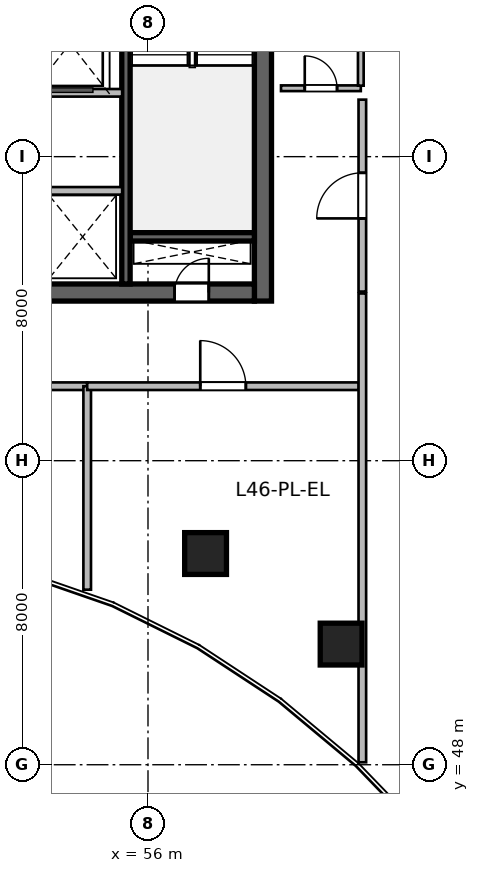
"""IFC4 building model, lengths in metres.
Left out: names, types, materials, properties, quantities, classifications, styles, units other than length and angle.
Written with IfcOpenShell. Run it as: python <this file> out.ifc"""

import sys

from ifc_helpers import new_model, si_unit, direction, frame, frame_2d, origin, origin_2d, place, context, subcontext, project, spatial, rectangle, circle, extrude, source, transform, mapped, element, fill, save


model = new_model("IFC4")
c1 = context("Model", 3, precision=1e-05, world=origin(), true_north=direction((0.0, 1.0)))
c2 = subcontext(c1, "Body", "Model", "MODEL_VIEW")
j1 = project(units=[si_unit("LENGTHUNIT", "METRE"), si_unit("PLANEANGLEUNIT", "RADIAN")], contexts=[c1])
p1 = place(None, origin())
s1 = spatial("IfcSite", under=j1, at=p1, CompositionType="ELEMENT")
p2 = place(p1, origin())
s2 = spatial("IfcBuilding", under=s1, at=p2, CompositionType="ELEMENT")
p3 = place(p2, frame((0.0, 0.0, 189.6)))
s3 = spatial("IfcBuildingStorey", under=s2, at=p3, CompositionType="ELEMENT", Elevation=189.6)
m1 = source(origin(), c2, "Body", "SweptSolid", [
    extrude(rectangle(XDim=12.0, YDim=0.45, at=frame_2d((6.0, 0.0))), origin(), (0.0, 0.0, 1.0), 4.8),
])
p4 = place(p3, frame((59.025, 60.2, 0.0), z_axis=(0.0, 0.0, 1.0), x_axis=(0.0, 1.0, 0.0)))
e1 = element("IfcWall", 1, at=p4, inside=s3, PredefinedType="SHEAR", context=c2, shape_type="MappedRepresentation", body=[
    mapped(m1, transform((0.0, 0.0, 0.0), scale=1.0)),
])
m2 = source(origin(), c2, "Body", "SweptSolid", [
    extrude(rectangle(XDim=21.6, YDim=0.45, at=frame_2d((10.8, 0.0))), origin(), (0.0, 0.0, 1.0), 4.8),
])
p5 = place(p3, frame((37.2, 60.425, 0.0), z_axis=(0.0, 0.0, 1.0), x_axis=(1.0, 0.0, 0.0)))
e2 = element("IfcWall", 2, at=p5, inside=s3, PredefinedType="SHEAR", context=c2, shape_type="MappedRepresentation", body=[
    mapped(m2, transform((0.0, 0.0, 0.0), scale=1.0)),
])
p6 = place(p5, frame((1.1, 0.0, 0.0)))
e3 = element("IfcOpeningElement", 3, at=p6, cuts=e2, PredefinedType="OPENING", context=c2, shape_type="SweptSolid", body=[
    extrude(rectangle(XDim=1.15, YDim=2.15, at=frame_2d((0.575, 1.075))), frame((0.0, 0.235, 0.0), z_axis=(0.0, -1.0, 0.0), x_axis=(1.0, 0.0, 0.0)), (0.0, 0.0, 1.0), 0.47),
])
p7 = place(p5, frame((19.5, 0.0, 0.0)))
e4 = element("IfcOpeningElement", 4, at=p7, cuts=e2, PredefinedType="OPENING", context=c2, shape_type="SweptSolid", body=[
    extrude(rectangle(XDim=0.9, YDim=2.1, at=frame_2d((0.45, 1.05))), frame((0.0, 0.235, 0.0), z_axis=(0.0, -1.0, 0.0), x_axis=(1.0, 0.0, 0.0)), (0.0, 0.0, 1.0), 0.47),
])
p8 = place(p5, frame((12.02, 0.0, 0.0)))
e5 = element("IfcOpeningElement", 5, at=p8, cuts=e2, PredefinedType="OPENING", context=c2, shape_type="SweptSolid", body=[
    extrude(rectangle(XDim=1.6, YDim=2.15, at=frame_2d((0.8, 1.075))), frame((0.0, 0.235, 0.0), z_axis=(0.0, -1.0, 0.0), x_axis=(1.0, 0.0, 0.0)), (0.0, 0.0, 1.0), 0.47),
])
m3 = source(origin(), c2, "Body", "SweptSolid", [
    extrude(rectangle(XDim=3.27, YDim=0.22, at=frame_2d((1.635, 0.0))), origin(), (0.0, 0.0, 1.0), 4.8),
])
p9 = place(p3, frame((55.53, 61.89, 0.0), z_axis=(0.0, 0.0, 1.0), x_axis=(1.0, 0.0, 0.0)))
e6 = element("IfcWall", 6, at=p9, inside=s3, PredefinedType="SHEAR", context=c2, shape_type="MappedRepresentation", body=[
    mapped(m3, transform((0.0, 0.0, 0.0), scale=1.0)),
])
m4 = source(origin(), c2, "Body", "SweptSolid", [
    extrude(rectangle(XDim=11.1, YDim=0.22, at=frame_2d((5.55, 0.0))), origin(), (0.0, 0.0, 1.0), 4.8),
])
p10 = place(p3, frame((55.42, 60.65, 0.0), z_axis=(0.0, 0.0, 1.0), x_axis=(0.0, 1.0, 0.0)))
e7 = element("IfcWall", 7, at=p10, inside=s3, PredefinedType="SHEAR", context=c2, shape_type="MappedRepresentation", body=[
    mapped(m4, transform((0.0, 0.0, 0.0), scale=1.0)),
])
p11 = place(p10, frame((9.595, 0.0, 0.0)))
e8 = element("IfcOpeningElement", 8, at=p11, cuts=e7, PredefinedType="OPENING", context=c2, shape_type="SweptSolid", body=[
    extrude(rectangle(XDim=1.15, YDim=2.15, at=frame_2d((0.575, 1.075))), frame((0.0, 0.12, 0.0), z_axis=(0.0, -1.0, 0.0), x_axis=(1.0, 0.0, 0.0)), (0.0, 0.0, 1.0), 0.24),
])
m5 = source(origin(), c2, "Body", "SweptSolid", [
    extrude(circle(Radius=0.55, at=origin_2d()), origin(), (0.0, 0.0, 1.0), 4.8),
])
for number, where, z_axis, x_axis in (
    (9, (57.515, 53.558, 0.0), (0.0, 0.0, 1.0), (0.289, 0.957, 0.0)),
    (10, (61.082, 51.175, 0.0), (0.0, 0.0, 1.0), (0.409, 0.912, 0.0)),
):
    element("IfcColumn", number, at=place(p3, frame(where, z_axis=z_axis, x_axis=x_axis)), inside=s3, PredefinedType="COLUMN", context=c2, shape_type="MappedRepresentation", body=[
        mapped(m5, transform((0.0, 0.0, 0.0), scale=1.0)),
    ])
m6 = source(origin(), c2, "Body", "SweptSolid", [
    extrude(rectangle(XDim=5.62, YDim=0.2, at=frame_2d((2.81, 0.0))), origin(), (0.0, 0.0, 1.0), 4.48),
])
p12 = place(p3, frame((49.7, 65.68, 0.0), z_axis=(0.0, 0.0, 1.0), x_axis=(1.0, 0.0, 0.0)))
e11 = element("IfcWall", 11, at=p12, inside=s3, PredefinedType="SOLIDWALL", context=c2, shape_type="MappedRepresentation", body=[
    mapped(m6, transform((0.0, 0.0, 0.0), scale=1.0)),
])
m7 = source(origin(), c2, "Body", "SweptSolid", [
    extrude(rectangle(XDim=4.1, YDim=0.2, at=frame_2d((2.05, 0.0))), origin(), (0.0, 0.0, 1.0), 4.48),
])
p13 = place(p3, frame((51.22, 63.1, 0.0), z_axis=(0.0, 0.0, 1.0), x_axis=(1.0, 0.0, 0.0)))
e12 = element("IfcWall", 12, at=p13, inside=s3, PredefinedType="SOLIDWALL", context=c2, shape_type="MappedRepresentation", body=[
    mapped(m7, transform((0.0, 0.0, 0.0), scale=1.0)),
])
m8 = source(origin(), c2, "Body", "SweptSolid", [
    extrude(rectangle(XDim=2.1, YDim=0.15, at=frame_2d((1.05, 0.0))), origin(), (0.0, 0.0, 1.0), 4.48),
])
p14 = place(p3, frame((59.5, 65.8, 0.0), z_axis=(0.0, 0.0, 1.0), x_axis=(1.0, 0.0, 0.0)))
e13 = element("IfcWall", 13, at=p14, inside=s3, PredefinedType="PARTITIONING", context=c2, shape_type="MappedRepresentation", body=[
    mapped(m8, transform((0.0, 0.0, 0.0), scale=1.0)),
])
p15 = place(p14, frame((0.625, 0.0, 0.0)))
e14 = element("IfcOpeningElement", 14, at=p15, cuts=e13, PredefinedType="OPENING", context=c2, shape_type="SweptSolid", body=[
    extrude(rectangle(XDim=0.85, YDim=2.1, at=frame_2d((0.425, 1.05))), frame((0.0, 0.085, 0.0), z_axis=(0.0, -1.0, 0.0), x_axis=(1.0, 0.0, 0.0)), (0.0, 0.0, 1.0), 0.17),
])
m9 = source(origin(), c2, "Body", "SweptSolid", [
    extrude(rectangle(XDim=3.565, YDim=0.15, at=frame_2d((1.783, 0.0))), origin(), (0.0, 0.0, 1.0), 4.48),
])
p16 = place(p3, frame((61.6, 65.867, 0.0), z_axis=(0.0, 0.0, 1.0), x_axis=(0.0, 1.0, 0.0)))
e15 = element("IfcWall", 15, at=p16, inside=s3, PredefinedType="PARTITIONING", context=c2, shape_type="MappedRepresentation", body=[
    mapped(m9, transform((0.0, 0.0, 0.0), scale=1.0)),
])
m10 = source(origin(), c2, "Body", "SweptSolid", [
    extrude(rectangle(XDim=6.8, YDim=0.2, at=frame_2d((3.4, 0.0))), origin(), (0.0, 0.0, 1.0), 3.925),
])
p17 = place(p3, frame((47.6, 57.96, 0.0), z_axis=(0.0, 0.0, 1.0), x_axis=(1.0, 0.0, 0.0)))
e16 = element("IfcWall", 16, at=p17, inside=s3, PredefinedType="SOLIDWALL", context=c2, shape_type="MappedRepresentation", body=[
    mapped(m10, transform((0.0, 0.0, 0.0), scale=1.0)),
])
p18 = place(p17, frame((2.8, 0.0, 0.0)))
e17 = element("IfcOpeningElement", 17, at=p18, cuts=e16, PredefinedType="OPENING", context=c2, shape_type="SweptSolid", body=[
    extrude(rectangle(XDim=1.2, YDim=2.15, at=frame_2d((0.6, 1.075))), frame((0.0, 0.11, 0.0), z_axis=(0.0, -1.0, 0.0), x_axis=(1.0, 0.0, 0.0)), (0.0, 0.0, 1.0), 0.22),
])
m11 = source(origin(), c2, "Body", "SweptSolid", [
    extrude(rectangle(XDim=5.354, YDim=0.2, at=frame_2d((2.677, 0.0))), origin(), (0.0, 0.0, 1.0), 4.48),
])
p19 = place(p3, frame((54.4, 52.606, 0.0), z_axis=(0.0, 0.0, 1.0), x_axis=(0.0, 1.0, 0.0)))
e18 = element("IfcWall", 18, at=p19, inside=s3, PredefinedType="SOLIDWALL", context=c2, shape_type="MappedRepresentation", body=[
    mapped(m11, transform((0.0, 0.0, 0.0), scale=1.0)),
])
m12 = source(origin(), c2, "Body", "SweptSolid", [
    extrude(rectangle(XDim=7.15, YDim=0.2, at=frame_2d((3.575, 0.0))), origin(), (0.0, 0.0, 1.0), 3.925),
])
p20 = place(p3, frame((54.4, 57.96, 0.0), z_axis=(0.0, 0.0, 1.0), x_axis=(1.0, 0.0, 0.0)))
e19 = element("IfcWall", 19, at=p20, inside=s3, PredefinedType="SOLIDWALL", context=c2, shape_type="MappedRepresentation", body=[
    mapped(m12, transform((0.0, 0.0, 0.0), scale=1.0)),
])
p21 = place(p20, frame((2.975, 0.0, 0.0)))
e20 = element("IfcOpeningElement", 20, at=p21, cuts=e19, PredefinedType="OPENING", context=c2, shape_type="SweptSolid", body=[
    extrude(rectangle(XDim=1.2, YDim=2.15, at=frame_2d((0.6, 1.075))), frame((0.0, 0.11, 0.0), z_axis=(0.0, -1.0, 0.0), x_axis=(1.0, 0.0, 0.0)), (0.0, 0.0, 1.0), 0.22),
])
m13 = source(origin(), c2, "Body", "SweptSolid", [
    extrude(rectangle(XDim=12.336, YDim=0.2, at=frame_2d((6.168, 0.0))), origin(), (0.0, 0.0, 1.0), 3.772),
])
p22 = place(p3, frame((61.64, 48.064, 0.0), z_axis=(0.0, 0.0, 1.0), x_axis=(0.0, 1.0, 0.0)))
e21 = element("IfcWall", 21, at=p22, inside=s3, PredefinedType="SOLIDWALL", context=c2, shape_type="MappedRepresentation", body=[
    mapped(m13, transform((0.0, 0.0, 0.0), scale=1.0)),
])
m14 = source(origin(), c2, "Body", "SweptSolid", [
    extrude(rectangle(XDim=5.05, YDim=0.2, at=frame_2d((2.525, 0.0))), origin(), (0.0, 0.0, 1.0), 4.48),
])
p23 = place(p3, frame((61.64, 60.45, 0.0), z_axis=(0.0, 0.0, 1.0), x_axis=(0.0, 1.0, 0.0)))
e22 = element("IfcWall", 22, at=p23, inside=s3, PredefinedType="SOLIDWALL", context=c2, shape_type="MappedRepresentation", body=[
    mapped(m14, transform((0.0, 0.0, 0.0), scale=1.0)),
])
p24 = place(p23, frame((1.925, 0.0, 0.0)))
e23 = element("IfcOpeningElement", 23, at=p24, cuts=e22, PredefinedType="OPENING", context=c2, shape_type="SweptSolid", body=[
    extrude(rectangle(XDim=1.2, YDim=2.15, at=frame_2d((0.6, 1.075))), frame((0.0, 0.11, 0.0), z_axis=(0.0, -1.0, 0.0), x_axis=(1.0, 0.0, 0.0)), (0.0, 0.0, 1.0), 0.22),
])
m15 = source(origin(), c2, "Body", "SweptSolid", [
    extrude(rectangle(XDim=0.9, YDim=2.1, at=frame_2d((0.45, 1.05))), frame((0.0, 0.025, 0.0), z_axis=(0.0, -1.0, 0.0), x_axis=(1.0, 0.0, 0.0)), (0.0, 0.0, 1.0), 0.05),
])
p25 = place(p7, origin())
e24 = element("IfcDoor", 24, at=p25, inside=s3, OperationType="SINGLE_SWING_RIGHT", PredefinedType="DOOR", context=c2, shape_type="MappedRepresentation", body=[
    mapped(m15, transform((0.0, 0.0, 0.0), scale=1.0)),
])
fill(e4, e24)
m16 = source(origin(), c2, "Body", "SweptSolid", [
    extrude(rectangle(XDim=0.85, YDim=2.1, at=frame_2d((0.425, 1.05))), frame((0.0, 0.025, 0.0), z_axis=(0.0, -1.0, 0.0), x_axis=(1.0, 0.0, 0.0)), (0.0, 0.0, 1.0), 0.05),
])
p26 = place(p15, origin())
e25 = element("IfcDoor", 25, at=p26, inside=s3, OperationType="SINGLE_SWING_LEFT", PredefinedType="DOOR", context=c2, shape_type="MappedRepresentation", body=[
    mapped(m16, transform((0.0, 0.0, 0.0), scale=1.0)),
])
fill(e14, e25)
m17 = source(origin(), c2, "Body", "SweptSolid", [
    extrude(rectangle(XDim=1.2, YDim=2.15, at=frame_2d((0.6, 1.075))), frame((0.0, 0.025, 0.0), z_axis=(0.0, -1.0, 0.0), x_axis=(1.0, 0.0, 0.0)), (0.0, 0.0, 1.0), 0.05),
])
p27 = place(p21, origin())
e26 = element("IfcDoor", 26, at=p27, inside=s3, OperationType="SINGLE_SWING_LEFT", PredefinedType="DOOR", context=c2, shape_type="MappedRepresentation", body=[
    mapped(m17, transform((0.0, 0.0, 0.0), scale=1.0)),
])
fill(e20, e26)
p28 = place(p24, origin())
e27 = element("IfcDoor", 27, at=p28, inside=s3, OperationType="SINGLE_SWING_LEFT", PredefinedType="DOOR", context=c2, shape_type="MappedRepresentation", body=[
    mapped(m17, transform((0.0, 0.0, 0.0), scale=1.0)),
])
fill(e23, e27)
save(model, sys.argv[1])
